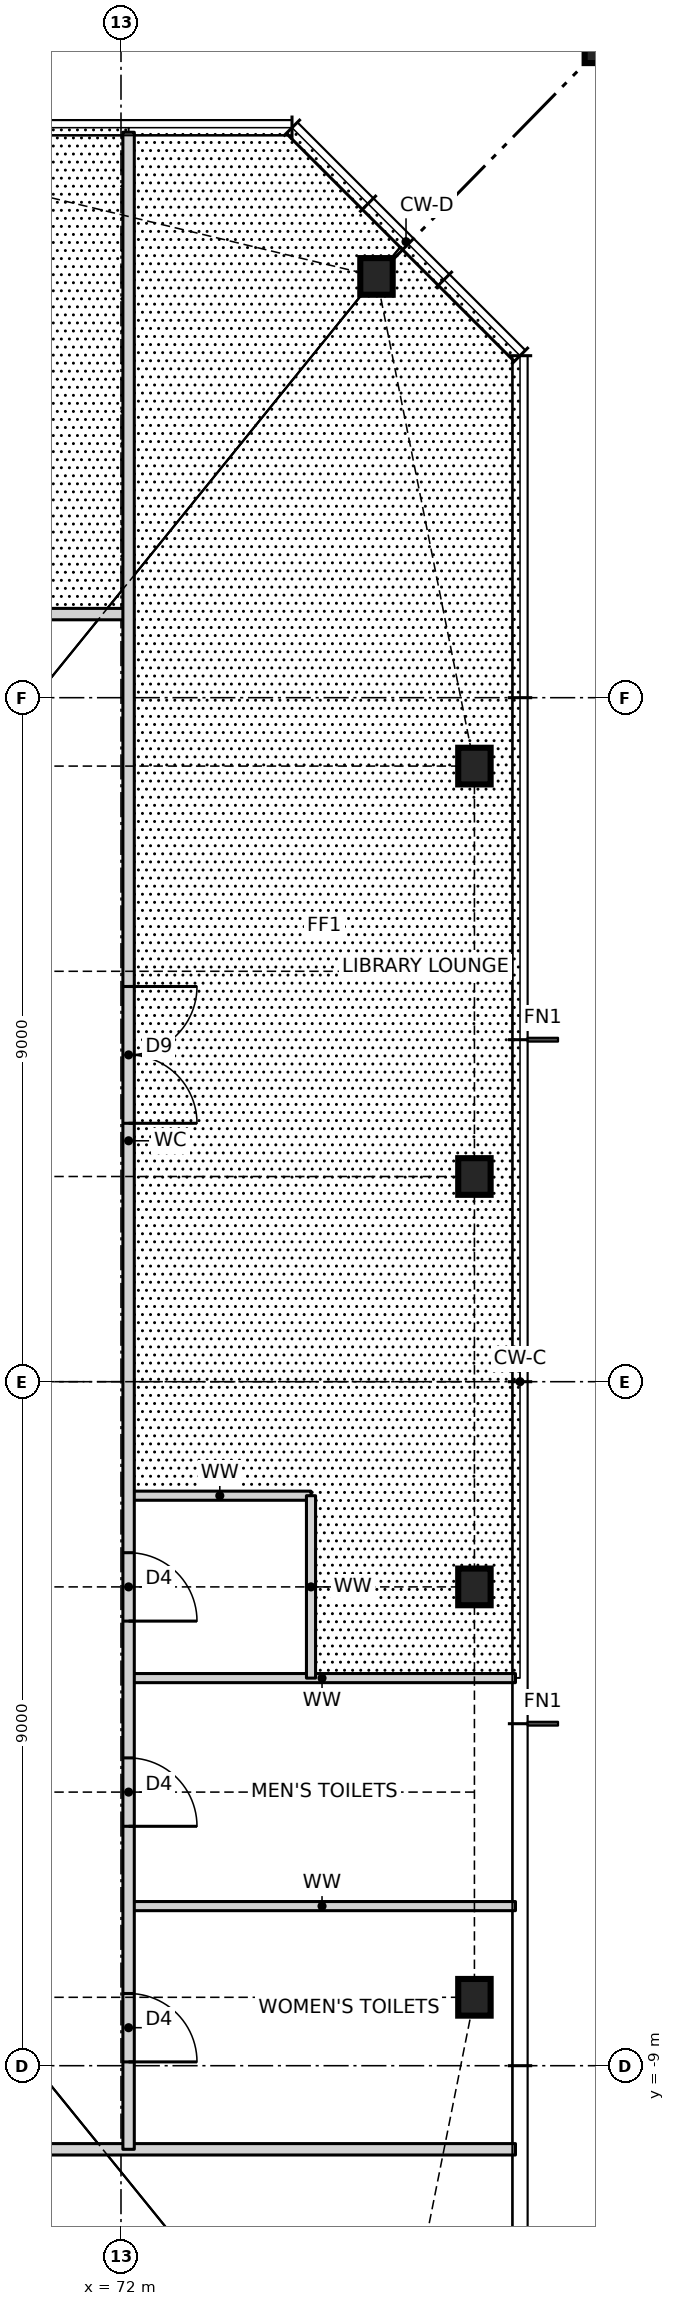
"""IFC4 building model, lengths in metres.
Left out: names, types, materials, properties, quantities, classifications, styles, units other than length and angle.
Written with IfcOpenShell. Run it as: python <this file> out.ifc"""

import sys

from ifc_helpers import new_model, si_unit, direction, frame, frame_2d, origin, origin_2d, place, context, subcontext, project, spatial, rectangle, hollow_rectangle, i_section, extrude, element, fill, save


model = new_model("IFC4")
c1 = context("Model", 3, precision=1e-05, world=origin(), true_north=direction((0.0, 1.0)))
c2 = subcontext(c1, "Body", "Model", "MODEL_VIEW")
j1 = project(units=[si_unit("LENGTHUNIT", "METRE"), si_unit("PLANEANGLEUNIT", "RADIAN")], contexts=[c1])
p1 = place(None, origin())
s1 = spatial("IfcSite", under=j1, at=p1, CompositionType="ELEMENT")
p2 = place(p1, origin())
s2 = spatial("IfcBuilding", under=s1, at=p2, CompositionType="ELEMENT")
p3 = place(p2, frame((0.0, 0.0, 98.0)))
s3 = spatial("IfcBuildingStorey", under=s2, at=p3, CompositionType="ELEMENT", Elevation=98.0)
for number, where, z_axis, x_axis in (
    (1, (76.65, -8.1, 0.0), (0.0, 0.0, 1.0), (1.0, 0.0, 0.0)),
    (2, (76.65, -2.7, 0.0), (0.0, 0.0, 1.0), (1.0, 0.0, 0.0)),
    (3, (76.65, 2.7, 0.0), (0.0, 0.0, 1.0), (1.0, 0.0, 0.0)),
    (4, (76.65, 8.1, 0.0), (0.0, 0.0, 1.0), (1.0, 0.0, 0.0)),
    (5, (75.361, 14.543, 0.0), (0.0, 0.0, 1.0), (1.0, 0.0, 0.0)),
):
    element("IfcColumn", number, at=place(p3, frame(where, z_axis=z_axis, x_axis=x_axis)), inside=s3, PredefinedType="COLUMN", context=c2, shape_type="SweptSolid", body=[
        extrude(i_section(OverallWidth=0.427, OverallDepth=0.483, WebThickness=0.051, FlangeThickness=0.082, at=origin_2d()), origin(), (0.0, 0.0, 1.0), 3.5),
    ])
p4 = place(p3, frame((78.65, 17.9, 0.0), z_axis=(0.0, 0.0, 1.0), x_axis=(1.0, 0.0, 0.0)))
e6 = element("IfcColumn", 6, at=p4, inside=s3, PredefinedType="COLUMN", context=c2, shape_type="SweptSolid", body=[
    extrude(hollow_rectangle(XDim=1.1, YDim=1.1, WallThickness=0.06, at=origin_2d()), origin(), (0.0, 0.0, 1.0), 3.5),
])
p5 = place(p3, frame((53.9, -10.1, 0.0), z_axis=(0.0, 0.0, 1.0), x_axis=(1.0, 0.0, 0.0)))
e7 = element("IfcWall", 7, at=p5, inside=s3, PredefinedType="PARTITIONING", context=c2, shape_type="SweptSolid", body=[
    extrude(rectangle(XDim=23.29, YDim=0.15, at=frame_2d((11.645, 0.0))), origin(), (0.0, 0.0, 1.0), 3.27),
])
p6 = place(p5, frame((8.2, 0.0, 0.0)))
e8 = element("IfcOpeningElement", 8, at=p6, cuts=e7, PredefinedType="OPENING", context=c2, shape_type="SweptSolid", body=[
    extrude(rectangle(XDim=1.8, YDim=2.1, at=frame_2d((0.9, 1.05))), frame((0.0, 0.085, 0.0), z_axis=(0.0, -1.0, 0.0), x_axis=(1.0, 0.0, 0.0)), (0.0, 0.0, 1.0), 0.17),
])
for number, where, z_axis, x_axis in (
    (9, (72.1, -6.9, 0.0), (0.0, 0.0, 1.0), (1.0, 0.0, 0.0)),
    (10, (72.1, -3.9, 0.0), (0.0, 0.0, 1.0), (1.0, 0.0, 0.0)),
):
    element("IfcWall", number, at=place(p3, frame(where, z_axis=z_axis, x_axis=x_axis)), inside=s3, PredefinedType="PARTITIONING", context=c2, shape_type="SweptSolid", body=[
        extrude(rectangle(XDim=5.09, YDim=0.12, at=frame_2d((2.545, 0.0))), origin(), (0.0, 0.0, 1.0), 3.27),
    ])
p7 = place(p3, frame((72.1, -1.5, 0.0), z_axis=(0.0, 0.0, 1.0), x_axis=(1.0, 0.0, 0.0)))
e11 = element("IfcWall", 11, at=p7, inside=s3, PredefinedType="PARTITIONING", context=c2, shape_type="SweptSolid", body=[
    extrude(rectangle(XDim=2.4, YDim=0.12, at=frame_2d((1.2, 0.0))), origin(), (0.0, 0.0, 1.0), 3.27),
])
p8 = place(p3, frame((48.81, 10.1, 0.0), z_axis=(0.0, 0.0, 1.0), x_axis=(1.0, 0.0, 0.0)))
e12 = element("IfcWall", 12, at=p8, inside=s3, PredefinedType="PARTITIONING", context=c2, shape_type="SweptSolid", body=[
    extrude(rectangle(XDim=23.29, YDim=0.15, at=frame_2d((11.645, 0.0))), origin(), (0.0, 0.0, 1.0), 3.27),
])
p9 = place(p8, frame((13.29, 0.0, 0.0)))
e13 = element("IfcOpeningElement", 13, at=p9, cuts=e12, PredefinedType="OPENING", context=c2, shape_type="SweptSolid", body=[
    extrude(rectangle(XDim=1.8, YDim=2.1, at=frame_2d((0.9, 1.05))), frame((0.0, 0.085, 0.0), z_axis=(0.0, -1.0, 0.0), x_axis=(1.0, 0.0, 0.0)), (0.0, 0.0, 1.0), 0.17),
])
p10 = place(p3, frame((74.5, -3.9, 0.0), z_axis=(0.0, 0.0, 1.0), x_axis=(0.0, 1.0, 0.0)))
e14 = element("IfcWall", 14, at=p10, inside=s3, PredefinedType="PARTITIONING", context=c2, shape_type="SweptSolid", body=[
    extrude(rectangle(XDim=2.4, YDim=0.12, at=frame_2d((1.2, 0.0))), origin(), (0.0, 0.0, 1.0), 3.27),
])
p11 = place(p3, frame((72.1, -10.1, 0.0), z_axis=(0.0, 0.0, 1.0), x_axis=(0.0, 1.0, 0.0)))
e15 = element("IfcWall", 15, at=p11, inside=s3, PredefinedType="PARTITIONING", context=c2, shape_type="SweptSolid", body=[
    extrude(rectangle(XDim=26.54, YDim=0.15, at=frame_2d((13.27, 0.0))), origin(), (0.0, 0.0, 1.0), 3.27),
])
p12 = place(p11, frame((1.15, 0.0, 0.0)))
e16 = element("IfcOpeningElement", 16, at=p12, cuts=e15, PredefinedType="OPENING", context=c2, shape_type="SweptSolid", body=[
    extrude(rectangle(XDim=0.9, YDim=2.1, at=frame_2d((0.45, 1.05))), frame((0.0, 0.085, 0.0), z_axis=(0.0, -1.0, 0.0), x_axis=(1.0, 0.0, 0.0)), (0.0, 0.0, 1.0), 0.17),
])
p13 = place(p11, frame((4.25, 0.0, 0.0)))
e17 = element("IfcOpeningElement", 17, at=p13, cuts=e15, PredefinedType="OPENING", context=c2, shape_type="SweptSolid", body=[
    extrude(rectangle(XDim=0.9, YDim=2.1, at=frame_2d((0.45, 1.05))), frame((0.0, 0.085, 0.0), z_axis=(0.0, -1.0, 0.0), x_axis=(1.0, 0.0, 0.0)), (0.0, 0.0, 1.0), 0.17),
])
p14 = place(p11, frame((6.95, 0.0, 0.0)))
e18 = element("IfcOpeningElement", 18, at=p14, cuts=e15, PredefinedType="OPENING", context=c2, shape_type="SweptSolid", body=[
    extrude(rectangle(XDim=0.9, YDim=2.1, at=frame_2d((0.45, 1.05))), frame((0.0, 0.085, 0.0), z_axis=(0.0, -1.0, 0.0), x_axis=(1.0, 0.0, 0.0)), (0.0, 0.0, 1.0), 0.17),
])
p15 = place(p11, frame((13.5, 0.0, 0.0)))
e19 = element("IfcOpeningElement", 19, at=p15, cuts=e15, PredefinedType="OPENING", context=c2, shape_type="SweptSolid", body=[
    extrude(rectangle(XDim=1.8, YDim=2.1, at=frame_2d((0.9, 1.05))), frame((0.0, 0.085, 0.0), z_axis=(0.0, -1.0, 0.0), x_axis=(1.0, 0.0, 0.0)), (0.0, 0.0, 1.0), 0.17),
])
p16 = place(p12, frame((0.9, 0.0, 0.0), z_axis=(0.0, 0.0, 1.0), x_axis=(-1.0, 0.0, 0.0)))
e20 = element("IfcDoor", 20, at=p16, inside=s3, OperationType="SINGLE_SWING_RIGHT", PredefinedType="DOOR", context=c2, shape_type="SweptSolid", body=[
    extrude(rectangle(XDim=0.9, YDim=2.1, at=frame_2d((0.45, 1.05))), frame((0.0, 0.025, 0.0), z_axis=(0.0, -1.0, 0.0), x_axis=(1.0, 0.0, 0.0)), (0.0, 0.0, 1.0), 0.05),
])
fill(e16, e20)
p17 = place(p13, frame((0.9, 0.0, 0.0), z_axis=(0.0, 0.0, 1.0), x_axis=(-1.0, 0.0, 0.0)))
e21 = element("IfcDoor", 21, at=p17, inside=s3, OperationType="SINGLE_SWING_RIGHT", PredefinedType="DOOR", context=c2, shape_type="SweptSolid", body=[
    extrude(rectangle(XDim=0.9, YDim=2.1, at=frame_2d((0.45, 1.05))), frame((0.0, 0.025, 0.0), z_axis=(0.0, -1.0, 0.0), x_axis=(1.0, 0.0, 0.0)), (0.0, 0.0, 1.0), 0.05),
])
fill(e17, e21)
p18 = place(p14, frame((0.9, 0.0, 0.0), z_axis=(0.0, 0.0, 1.0), x_axis=(-1.0, 0.0, 0.0)))
e22 = element("IfcDoor", 22, at=p18, inside=s3, OperationType="SINGLE_SWING_RIGHT", PredefinedType="DOOR", context=c2, shape_type="SweptSolid", body=[
    extrude(rectangle(XDim=0.9, YDim=2.1, at=frame_2d((0.45, 1.05))), frame((0.0, 0.025, 0.0), z_axis=(0.0, -1.0, 0.0), x_axis=(1.0, 0.0, 0.0)), (0.0, 0.0, 1.0), 0.05),
])
fill(e18, e22)
p19 = place(p15, frame((1.8, 0.0, 0.0), z_axis=(0.0, 0.0, 1.0), x_axis=(-1.0, 0.0, 0.0)))
e23 = element("IfcDoor", 23, at=p19, inside=s3, OperationType="DOUBLE_DOOR_SINGLE_SWING", PredefinedType="DOOR", context=c2, shape_type="SweptSolid", body=[
    extrude(rectangle(XDim=1.8, YDim=2.1, at=frame_2d((0.9, 1.05))), frame((0.0, 0.025, 0.0), z_axis=(0.0, -1.0, 0.0), x_axis=(1.0, 0.0, 0.0)), (0.0, 0.0, 1.0), 0.05),
])
fill(e19, e23)
save(model, sys.argv[1])
